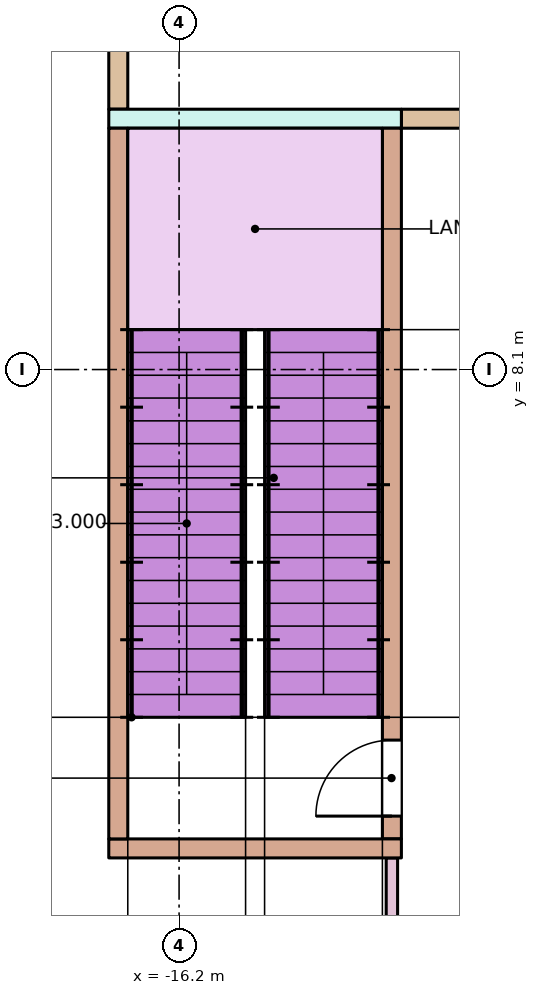
"""IFC4 building model, lengths in metres.
Left out: names, types, materials, properties, quantities, classifications, styles, units other than length and angle.
Written with IfcOpenShell. Run it as: python <this file> out.ifc"""

import sys

from ifc_helpers import new_model, si_unit, direction, frame, frame_2d, origin, place, context, subcontext, project, spatial, rectangle, extrude, element, fill, save


model = new_model("IFC4")
c1 = context("Model", 3, precision=1e-05, world=origin(), true_north=direction((0.0, 1.0)))
c2 = subcontext(c1, "Body", "Model", "MODEL_VIEW")
j1 = project(units=[si_unit("LENGTHUNIT", "METRE"), si_unit("PLANEANGLEUNIT", "RADIAN")], contexts=[c1])
p1 = place(None, origin())
s1 = spatial("IfcSite", under=j1, at=p1, CompositionType="ELEMENT")
p2 = place(p1, origin())
s2 = spatial("IfcBuilding", under=s1, at=p2, CompositionType="ELEMENT")
p3 = place(p2, origin())
s3 = spatial("IfcBuildingStorey", under=s2, at=p3, CompositionType="ELEMENT", Elevation=0.0)
p4 = place(p3, frame((-17.125, 11.4, 0.0), z_axis=(0.0, 0.0, 1.0), x_axis=(1.0, 0.0, 0.0)))
e1 = element("IfcWall", 1, at=p4, inside=s3, PredefinedType="STANDARD", context=c2, shape_type="SweptSolid", body=[
    extrude(rectangle(XDim=3.85, YDim=0.25, at=frame_2d((1.925, 0.0))), origin(), (0.0, 0.0, 1.0), 5.68),
])
p5 = place(p3, frame((-13.275, 11.4, 0.0), z_axis=(0.0, 0.0, 1.0), x_axis=(1.0, 0.0, 0.0)))
e2 = element("IfcWall", 2, at=p5, inside=s3, PredefinedType="PARTITIONING", context=c2, shape_type="SweptSolid", body=[
    extrude(rectangle(XDim=15.85, YDim=0.25, at=frame_2d((7.925, 0.0))), origin(), (0.0, 0.0, 1.0), 5.68),
])
p6 = place(p5, frame((7.45, 0.0, 0.0)))
e3 = element("IfcOpeningElement", 3, at=p6, cuts=e2, PredefinedType="OPENING", context=c2, shape_type="SweptSolid", body=[
    extrude(rectangle(XDim=1.0, YDim=2.1, at=frame_2d((0.5, 1.05))), frame((0.0, 0.135, 0.0), z_axis=(0.0, -1.0, 0.0), x_axis=(1.0, 0.0, 0.0)), (0.0, 0.0, 1.0), 0.27),
])
p7 = place(p3, frame((-17.0, 11.525, 0.0), z_axis=(0.0, 0.0, 1.0), x_axis=(0.0, 1.0, 0.0)))
e4 = element("IfcWall", 4, at=p7, inside=s3, PredefinedType="PARTITIONING", context=c2, shape_type="SweptSolid", body=[
    extrude(rectangle(XDim=2.35, YDim=0.25, at=frame_2d((1.175, 0.0))), origin(), (0.0, 0.0, 1.0), 5.68),
])
p8 = place(p3, frame((-13.4, 1.925, 0.0), z_axis=(0.0, 0.0, 1.0), x_axis=(0.0, 1.0, 0.0)))
e5 = element("IfcWall", 5, at=p8, inside=s3, PredefinedType="STANDARD", context=c2, shape_type="SweptSolid", body=[
    extrude(rectangle(XDim=9.35, YDim=0.25, at=frame_2d((4.675, 0.0))), origin(), (0.0, 0.0, 1.0), 5.68),
])
p9 = place(p8, frame((0.3, 0.0, 0.0)))
e6 = element("IfcOpeningElement", 6, at=p9, cuts=e5, PredefinedType="OPENING", context=c2, shape_type="SweptSolid", body=[
    extrude(rectangle(XDim=1.0, YDim=2.1, at=frame_2d((0.5, 1.05))), frame((0.0, 0.135, 0.0), z_axis=(0.0, -1.0, 0.0), x_axis=(1.0, 0.0, 0.0)), (0.0, 0.0, 1.0), 0.27),
])
p10 = place(p3, frame((-17.125, 1.8, 0.0), z_axis=(0.0, 0.0, 1.0), x_axis=(1.0, 0.0, 0.0)))
e7 = element("IfcWall", 7, at=p10, inside=s3, PredefinedType="STANDARD", context=c2, shape_type="SweptSolid", body=[
    extrude(rectangle(XDim=3.85, YDim=0.25, at=frame_2d((1.925, 0.0))), origin(), (0.0, 0.0, 1.0), 5.68),
])
p11 = place(p3, frame((-17.0, 1.925, 0.0), z_axis=(0.0, 0.0, 1.0), x_axis=(0.0, 1.0, 0.0)))
e8 = element("IfcWall", 8, at=p11, inside=s3, PredefinedType="STANDARD", context=c2, shape_type="SweptSolid", body=[
    extrude(rectangle(XDim=9.35, YDim=0.25, at=frame_2d((4.675, 0.0))), origin(), (0.0, 0.0, 1.0), 5.68),
])
p12 = place(p3, frame((-13.4, -2.375, 0.0), z_axis=(0.0, 0.0, 1.0), x_axis=(0.0, 1.0, 0.0)))
e9 = element("IfcWall", 9, at=p12, inside=s3, PredefinedType="PARTITIONING", context=c2, shape_type="SweptSolid", body=[
    extrude(rectangle(XDim=4.05, YDim=0.15, at=frame_2d((2.025, 0.0))), origin(), (0.0, 0.0, 1.0), 5.68),
])
p13 = place(p9, origin())
e10 = element("IfcDoor", 10, at=p13, inside=s3, OperationType="SINGLE_SWING_LEFT", PredefinedType="DOOR", context=c2, shape_type="SweptSolid", body=[
    extrude(rectangle(XDim=1.0, YDim=2.1, at=frame_2d((0.5, 1.05))), frame((0.0, 0.025, 0.0), z_axis=(0.0, -1.0, 0.0), x_axis=(1.0, 0.0, 0.0)), (0.0, 0.0, 1.0), 0.05),
])
fill(e6, e10)
save(model, sys.argv[1])
